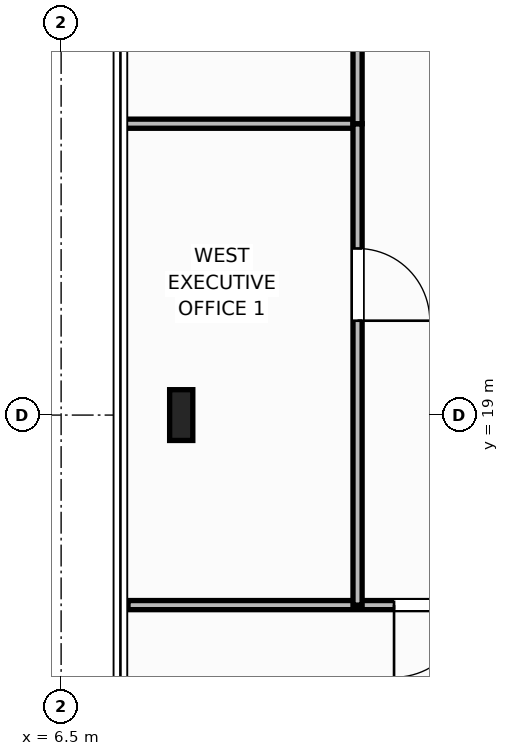
"""IFC4 building model, lengths in metres.
Left out: names, types, materials, properties, quantities, classifications, styles, units other than length and angle.
Written with IfcOpenShell. Run it as: python <this file> out.ifc"""

import sys

from ifc_helpers import new_model, si_unit, direction, frame, frame_2d, origin, origin_2d, place, context, subcontext, project, spatial, rectangle, i_section, extrude, element, fill, save


model = new_model("IFC4")
c1 = context("Model", 3, precision=1e-05, world=origin(), true_north=direction((0.0, 1.0)))
c2 = subcontext(c1, "Body", "Model", "MODEL_VIEW")
j1 = project(units=[si_unit("LENGTHUNIT", "METRE"), si_unit("PLANEANGLEUNIT", "RADIAN")], contexts=[c1])
p1 = place(None, origin())
s1 = spatial("IfcSite", under=j1, at=p1, CompositionType="ELEMENT")
p2 = place(p1, origin())
s2 = spatial("IfcBuilding", under=s1, at=p2, CompositionType="ELEMENT")
p3 = place(p2, frame((0.0, 0.0, 298.4)))
s3 = spatial("IfcBuildingStorey", under=s2, at=p3, CompositionType="ELEMENT", Elevation=298.4)
p4 = place(p3, frame((8.08, 19.0, 0.0), z_axis=(0.0, 0.0, 1.0), x_axis=(1.0, 0.0, 0.0)))
e1 = element("IfcColumn", 1, at=p4, inside=s3, PredefinedType="COLUMN", context=c2, shape_type="SweptSolid", body=[
    extrude(i_section(OverallWidth=0.305, OverallDepth=0.668, WebThickness=0.021, FlangeThickness=0.04, at=origin_2d()), origin(), (0.0, 0.0, 1.0), 4.0),
])
p5 = place(p3, frame((7.38, 16.5, 0.0), z_axis=(0.0, 0.0, 1.0), x_axis=(1.0, 0.0, 0.0)))
e2 = element("IfcWall", 2, at=p5, inside=s3, PredefinedType="PARTITIONING", context=c2, shape_type="SweptSolid", body=[
    extrude(rectangle(XDim=6.734, YDim=0.12, at=frame_2d((3.367, 0.0))), origin(), (0.0, 0.0, 1.0), 3.788),
])
p6 = place(p5, frame((3.5, 0.0, 0.0)))
e3 = element("IfcOpeningElement", 3, at=p6, cuts=e2, PredefinedType="OPENING", context=c2, shape_type="SweptSolid", body=[
    extrude(rectangle(XDim=0.95, YDim=2.15, at=frame_2d((0.475, 1.075))), frame((0.0, 0.07, 0.0), z_axis=(0.0, -1.0, 0.0), x_axis=(1.0, 0.0, 0.0)), (0.0, 0.0, 1.0), 0.14),
])
p7 = place(p3, frame((7.22, 22.833, 0.0), z_axis=(0.0, 0.0, 1.0), x_axis=(1.0, 0.0, 0.0)))
e4 = element("IfcWall", 4, at=p7, inside=s3, PredefinedType="PARTITIONING", context=c2, shape_type="SweptSolid", body=[
    extrude(rectangle(XDim=3.18, YDim=0.12, at=frame_2d((1.59, 0.0))), origin(), (0.0, 0.0, 1.0), 3.788),
])
p8 = place(p3, frame((10.4, 16.5, 0.0), z_axis=(0.0, 0.0, 1.0), x_axis=(0.0, 1.0, 0.0)))
e5 = element("IfcWall", 5, at=p8, inside=s3, PredefinedType="PARTITIONING", context=c2, shape_type="SweptSolid", body=[
    extrude(rectangle(XDim=6.333, YDim=0.12, at=frame_2d((3.167, 0.0))), origin(), (0.0, 0.0, 1.0), 3.788),
])
p9 = place(p8, frame((3.742, 0.0, 0.0)))
e6 = element("IfcOpeningElement", 6, at=p9, cuts=e5, PredefinedType="OPENING", context=c2, shape_type="SweptSolid", body=[
    extrude(rectangle(XDim=0.95, YDim=2.15, at=frame_2d((0.475, 1.075))), frame((0.0, 0.07, 0.0), z_axis=(0.0, -1.0, 0.0), x_axis=(1.0, 0.0, 0.0)), (0.0, 0.0, 1.0), 0.14),
])
p10 = place(p3, frame((10.4, 22.833, 0.0), z_axis=(0.0, 0.0, 1.0), x_axis=(0.0, 1.0, 0.0)))
e7 = element("IfcWall", 7, at=p10, inside=s3, PredefinedType="PARTITIONING", context=c2, shape_type="SweptSolid", body=[
    extrude(rectangle(XDim=6.333, YDim=0.12, at=frame_2d((3.167, 0.0))), origin(), (0.0, 0.0, 1.0), 3.788),
])
p11 = place(p10, frame((2.692, 0.0, 0.0)))
e8 = element("IfcOpeningElement", 8, at=p11, cuts=e7, PredefinedType="OPENING", context=c2, shape_type="SweptSolid", body=[
    extrude(rectangle(XDim=0.95, YDim=2.15, at=frame_2d((0.475, 1.075))), frame((0.0, 0.07, 0.0), z_axis=(0.0, -1.0, 0.0), x_axis=(1.0, 0.0, 0.0)), (0.0, 0.0, 1.0), 0.14),
])
p12 = place(p6, origin())
e9 = element("IfcDoor", 9, at=p12, inside=s3, OperationType="SINGLE_SWING_RIGHT", PredefinedType="DOOR", context=c2, shape_type="SweptSolid", body=[
    extrude(rectangle(XDim=0.95, YDim=2.15, at=frame_2d((0.475, 1.075))), frame((0.0, 0.025, 0.0), z_axis=(0.0, -1.0, 0.0), x_axis=(1.0, 0.0, 0.0)), (0.0, 0.0, 1.0), 0.05),
])
fill(e3, e9)
p13 = place(p9, origin())
e10 = element("IfcDoor", 10, at=p13, inside=s3, OperationType="SINGLE_SWING_RIGHT", PredefinedType="DOOR", context=c2, shape_type="SweptSolid", body=[
    extrude(rectangle(XDim=0.95, YDim=2.15, at=frame_2d((0.475, 1.075))), frame((0.0, 0.025, 0.0), z_axis=(0.0, -1.0, 0.0), x_axis=(1.0, 0.0, 0.0)), (0.0, 0.0, 1.0), 0.05),
])
fill(e6, e10)
save(model, sys.argv[1])
